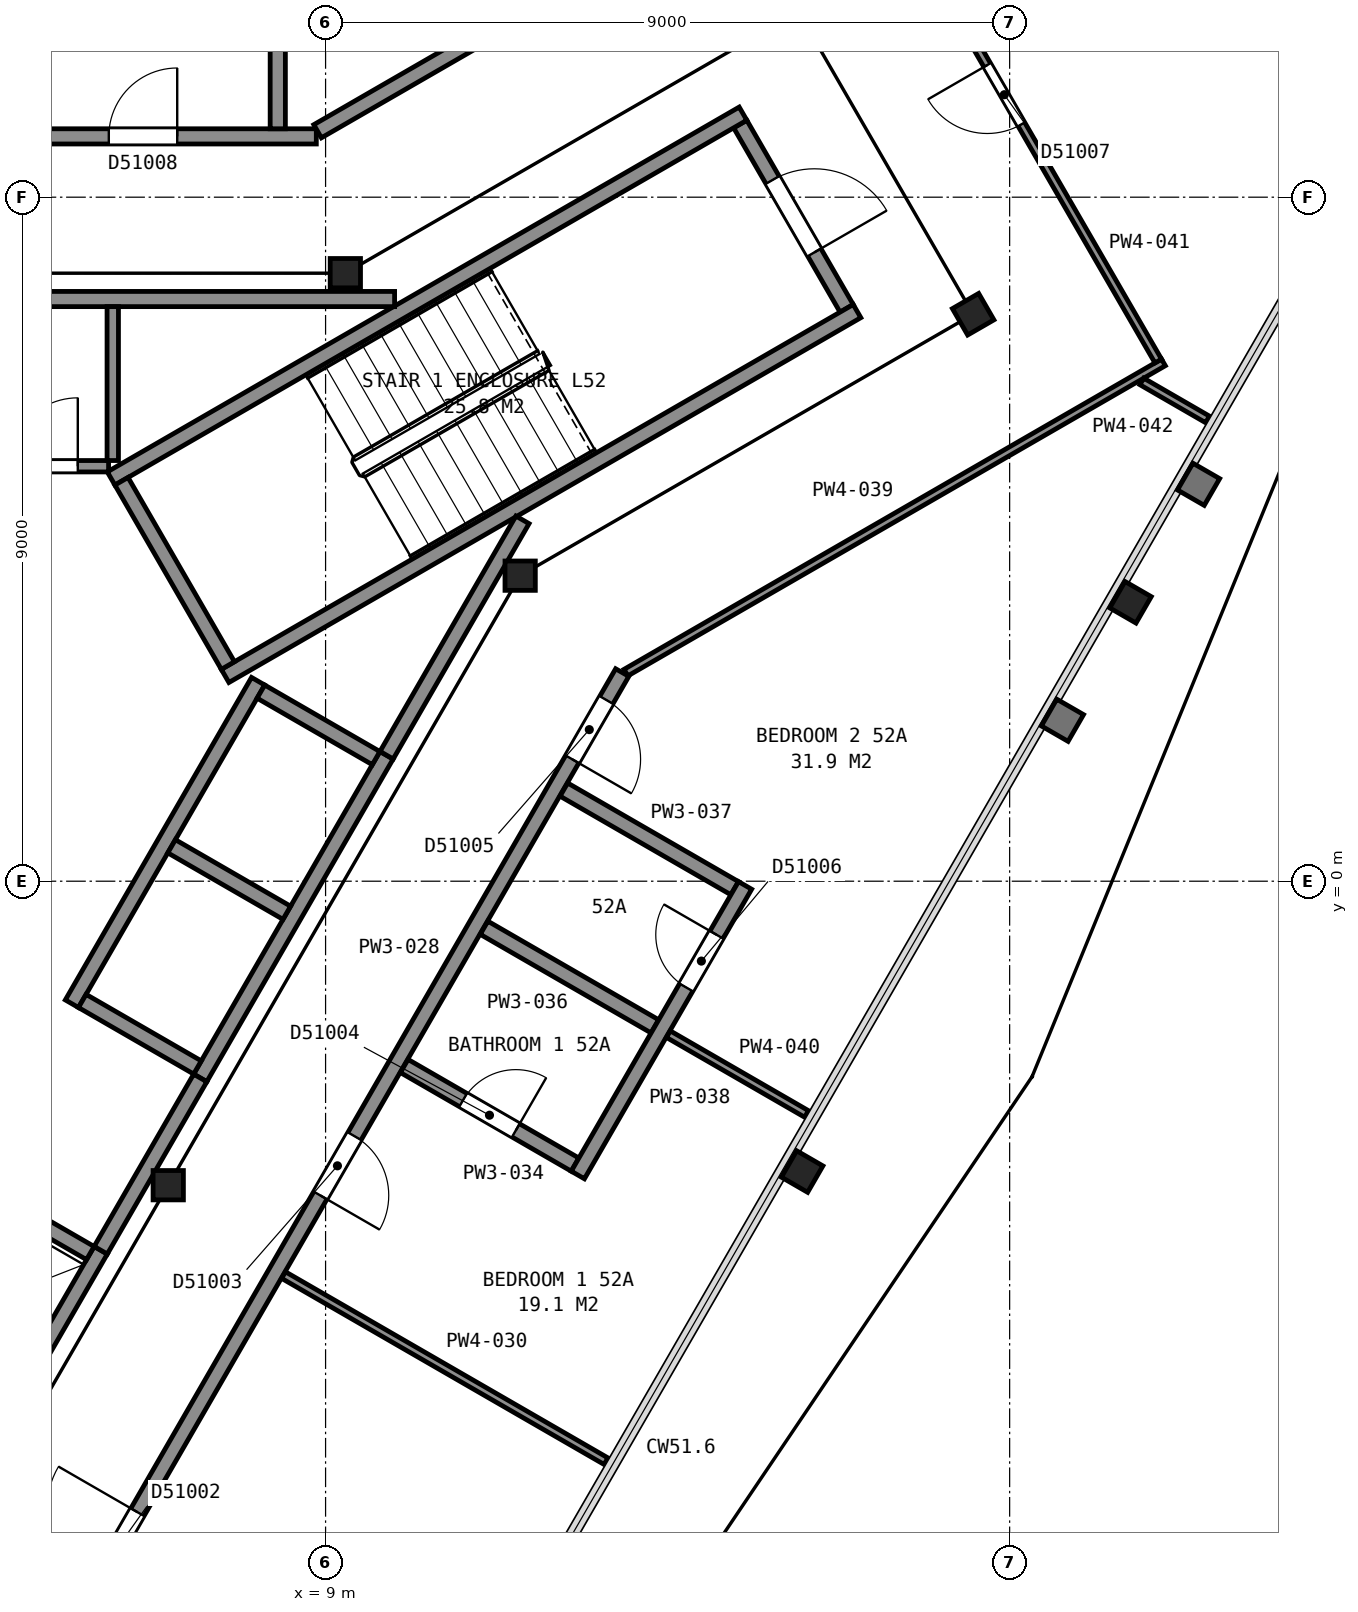
"""IFC4 building model, lengths in metres.
Left out: names, types, materials, properties, quantities, classifications, styles, units other than length and angle.
Written with IfcOpenShell. Run it as: python <this file> out.ifc"""

import sys

from ifc_helpers import new_model, si_unit, direction, frame, frame_2d, origin, origin_2d, place, context, subcontext, project, spatial, rectangle, i_section, extrude, element, fill, save


model = new_model("IFC4")
c1 = context("Model", 3, precision=1e-05, world=origin(), true_north=direction((0.0, 1.0)))
c2 = subcontext(c1, "Body", "Model", "MODEL_VIEW")
j1 = project(units=[si_unit("LENGTHUNIT", "METRE"), si_unit("PLANEANGLEUNIT", "RADIAN")], contexts=[c1])
p1 = place(None, origin())
s1 = spatial("IfcSite", under=j1, at=p1, CompositionType="ELEMENT")
p2 = place(p1, origin())
s2 = spatial("IfcBuilding", under=s1, at=p2, CompositionType="ELEMENT")
p3 = place(p2, frame((0.0, 0.0, 210.1)))
s3 = spatial("IfcBuildingStorey", under=s2, at=p3, CompositionType="ELEMENT", Elevation=210.1)
p4 = place(p3, frame((15.27, -3.82, 0.0), z_axis=(0.0, 0.0, 1.0), x_axis=(-0.5, -0.866025403784, 0.0)))
e1 = element("IfcColumn", 1, at=p4, inside=s3, PredefinedType="COLUMN", context=c2, shape_type="SweptSolid", body=[
    extrude(i_section(OverallWidth=0.401, OverallDepth=0.399, WebThickness=0.025, FlangeThickness=0.04, FilletRadius=0.015, at=origin_2d()), origin(), (0.0, 0.0, 1.0), 3.665),
])
p5 = place(p3, frame((19.59, 3.67, 0.0), z_axis=(0.0, 0.0, 1.0), x_axis=(-0.5, -0.866025403784, 0.0)))
e2 = element("IfcColumn", 2, at=p5, inside=s3, PredefinedType="COLUMN", context=c2, shape_type="SweptSolid", body=[
    extrude(i_section(OverallWidth=0.401, OverallDepth=0.399, WebThickness=0.025, FlangeThickness=0.04, FilletRadius=0.015, at=origin_2d()), origin(), (0.0, 0.0, 1.0), 3.66),
])
p6 = place(p3, frame((11.56, 4.02, 0.0), z_axis=(0.0, 0.0, 1.0), x_axis=(1.0, 0.0, 0.0)))
e3 = element("IfcColumn", 3, at=p6, inside=s3, PredefinedType="COLUMN", context=c2, shape_type="SweptSolid", body=[
    extrude(i_section(OverallWidth=0.399, OverallDepth=0.386, WebThickness=0.021, FlangeThickness=0.033, FilletRadius=0.015, at=origin_2d()), origin(), (0.0, 0.0, 1.0), 3.7),
])
p7 = place(p3, frame((17.52, 7.46, 0.0), z_axis=(0.0, 0.0, 1.0), x_axis=(0.5, -0.866025403784, 0.0)))
e4 = element("IfcColumn", 4, at=p7, inside=s3, PredefinedType="COLUMN", context=c2, shape_type="SweptSolid", body=[
    extrude(i_section(OverallWidth=0.401, OverallDepth=0.399, WebThickness=0.025, FlangeThickness=0.04, FilletRadius=0.015, at=origin_2d()), origin(), (0.0, 0.0, 1.0), 3.7),
])
for number, where, z_axis, x_axis in (
    (5, (9.26, 8.0, 0.0), (0.0, 0.0, 1.0), (1.0, 0.0, 0.0)),
    (6, (6.93, -4.0, 0.0), (0.0, 0.0, 1.0), (1.0, 0.0, 0.0)),
):
    element("IfcColumn", number, at=place(p3, frame(where, z_axis=z_axis, x_axis=x_axis)), inside=s3, PredefinedType="COLUMN", context=c2, shape_type="SweptSolid", body=[
        extrude(i_section(OverallWidth=0.399, OverallDepth=0.386, WebThickness=0.021, FlangeThickness=0.033, FilletRadius=0.015, at=origin_2d()), origin(), (0.0, 0.0, 1.0), 3.7),
    ])
p8 = place(p3, frame((15.855, 7.538, 0.0), z_axis=(0.0, 0.0, 1.0), x_axis=(-0.500049511043, 0.865996816683, 0.0)))
e7 = element("IfcWall", 7, at=p8, inside=s3, PredefinedType="PARTITIONING", context=c2, shape_type="SweptSolid", body=[
    extrude(rectangle(XDim=2.8, YDim=0.2, at=frame_2d((1.4, 0.0))), origin(), (0.0, 0.0, 1.0), 3.45),
])
p9 = place(p8, frame((0.85, 0.0, 0.0)))
e8 = element("IfcOpeningElement", 8, at=p9, cuts=e7, PredefinedType="OPENING", context=c2, shape_type="SweptSolid", body=[
    extrude(rectangle(XDim=1.1, YDim=2.1, at=frame_2d((0.55, 1.05))), frame((0.0, 0.11, 0.0), z_axis=(0.0, -1.0, 0.0), x_axis=(1.0, 0.0, 0.0)), (0.0, 0.0, 1.0), 0.22),
])
for number, where, z_axis, x_axis in (
    (9, (6.178, 5.299, 0.0), (0.0, 0.0, 1.0), (0.866, 0.5, 0.0)),
    (10, (7.678, 2.701, 0.0), (0.0, 0.0, 1.0), (0.866, 0.5, 0.0)),
):
    element("IfcWall", number, at=place(p3, frame(where, z_axis=z_axis, x_axis=x_axis)), inside=s3, PredefinedType="PARTITIONING", context=c2, shape_type="SweptSolid", body=[
        extrude(rectangle(XDim=9.6, YDim=0.2, at=frame_2d((4.8, 0.0))), origin(), (0.0, 0.0, 1.0), 3.45),
    ])
p10 = place(p3, frame((7.715, 2.838, 0.0), z_axis=(0.0, 0.0, 1.0), x_axis=(-0.500049511043, 0.865996816683, 0.0)))
e11 = element("IfcWall", 11, at=p10, inside=s3, PredefinedType="PARTITIONING", context=c2, shape_type="SweptSolid", body=[
    extrude(rectangle(XDim=2.8, YDim=0.2, at=frame_2d((1.4, 0.0))), origin(), (0.0, 0.0, 1.0), 3.45),
])
p11 = place(p3, frame((4.766, -7.065, 0.0), z_axis=(0.0, 0.0, 1.0), x_axis=(0.499948979701, 0.866054858364, 0.0)))
e12 = element("IfcWall", 12, at=p11, inside=s3, PredefinedType="PARTITIONING", context=c2, shape_type="SweptSolid", body=[
    extrude(rectangle(XDim=2.55, YDim=0.2, at=frame_2d((1.275, 0.0))), origin(), (0.0, 0.0, 1.0), 3.7),
])
p12 = place(p3, frame((7.351, -2.587, 0.0), z_axis=(0.0, 0.0, 1.0), x_axis=(0.500002801628, 0.866023786258, 0.0)))
e13 = element("IfcWall", 13, at=p12, inside=s3, PredefinedType="PARTITIONING", context=c2, shape_type="SweptSolid", body=[
    extrude(rectangle(XDim=4.9, YDim=0.2, at=frame_2d((2.45, 0.0))), origin(), (0.0, 0.0, 1.0), 3.7),
])
p13 = place(p3, frame((5.663, -1.612, 0.0), z_axis=(0.0, 0.0, 1.0), x_axis=(0.49998122708, 0.866036242063, 0.0)))
e14 = element("IfcWall", 14, at=p13, inside=s3, PredefinedType="PARTITIONING", context=c2, shape_type="SweptSolid", body=[
    extrude(rectangle(XDim=4.9, YDim=0.2, at=frame_2d((2.45, 0.0))), origin(), (0.0, 0.0, 1.0), 3.7),
])
p14 = place(p3, frame((9.665, 1.62, 0.0), z_axis=(0.0, 0.0, 1.0), x_axis=(-0.866002029911, 0.500040482552, 0.0)))
e15 = element("IfcWall", 15, at=p14, inside=s3, PredefinedType="PARTITIONING", context=c2, shape_type="SweptSolid", body=[
    extrude(rectangle(XDim=1.75, YDim=0.2, at=frame_2d((0.875, 0.0))), origin(), (0.0, 0.0, 1.0), 3.7),
])
for number, where, z_axis, x_axis in (
    (16, (8.49, -0.416, 0.0), (0.0, 0.0, 1.0), (-0.866, 0.5, 0.0)),
    (17, (7.315, -2.451, 0.0), (0.0, 0.0, 1.0), (-0.866, 0.5, 0.0)),
):
    element("IfcWall", number, at=place(p3, frame(where, z_axis=z_axis, x_axis=x_axis)), inside=s3, PredefinedType="PARTITIONING", context=c2, shape_type="SweptSolid", body=[
        extrude(rectangle(XDim=1.75, YDim=0.2, at=frame_2d((0.875, 0.0))), origin(), (0.0, 0.0, 1.0), 3.7),
    ])
p15 = place(p3, frame((5.905, -4.893, 0.0), z_axis=(0.0, 0.0, 1.0), x_axis=(-0.866002029911, 0.500040482552, 0.0)))
e18 = element("IfcWall", 18, at=p15, inside=s3, PredefinedType="PARTITIONING", context=c2, shape_type="SweptSolid", body=[
    extrude(rectangle(XDim=1.75, YDim=0.2, at=frame_2d((0.875, 0.0))), origin(), (0.0, 0.0, 1.0), 3.7),
])
p16 = place(p3, frame((-3.933, 7.66, 0.0), z_axis=(0.0, 0.0, 1.0), x_axis=(1.0, 0.0, 0.0)))
e19 = element("IfcWall", 19, at=p16, inside=s3, PredefinedType="PARTITIONING", context=c2, shape_type="SweptSolid", body=[
    extrude(rectangle(XDim=13.841, YDim=0.2, at=frame_2d((6.92, 0.0))), origin(), (0.0, 0.0, 1.0), 3.45),
])
p17 = place(p3, frame((0.925, 5.46, 0.0), z_axis=(0.0, 0.0, 1.0), x_axis=(1.0, 0.0, 0.0)))
e20 = element("IfcWall", 20, at=p17, inside=s3, PredefinedType="PARTITIONING", context=c2, shape_type="SweptSolid", body=[
    extrude(rectangle(XDim=5.22, YDim=0.15, at=frame_2d((2.61, 0.0))), origin(), (0.0, 0.0, 1.0), 3.45),
])
p18 = place(p17, frame((3.915, 0.0, 0.0)))
e21 = element("IfcOpeningElement", 21, at=p18, cuts=e20, PredefinedType="OPENING", context=c2, shape_type="SweptSolid", body=[
    extrude(rectangle(XDim=0.9, YDim=2.1, at=frame_2d((0.45, 1.05))), frame((0.0, 0.085, 0.0), z_axis=(0.0, -1.0, 0.0), x_axis=(1.0, 0.0, 0.0)), (0.0, 0.0, 1.0), 0.17),
])
p19 = place(p3, frame((6.042, -4.855, 0.0), z_axis=(0.0, 0.0, 1.0), x_axis=(0.500252727967, 0.865879442048, 0.0)))
e22 = element("IfcWall", 22, at=p19, inside=s3, PredefinedType="PARTITIONING", context=c2, shape_type="SweptSolid", body=[
    extrude(rectangle(XDim=2.617, YDim=0.2, at=frame_2d((1.309, 0.0))), origin(), (0.0, 0.0, 1.0), 3.45),
])
p20 = place(p3, frame((6.2, 5.535, 0.0), z_axis=(0.0, 0.0, 1.0), x_axis=(0.0, 1.0, 0.0)))
e23 = element("IfcWall", 23, at=p20, inside=s3, PredefinedType="PARTITIONING", context=c2, shape_type="SweptSolid", body=[
    extrude(rectangle(XDim=2.025, YDim=0.15, at=frame_2d((1.013, 0.0))), origin(), (0.0, 0.0, 1.0), 3.45),
])
p21 = place(p3, frame((9.803, 1.658, 0.0), z_axis=(0.0, 0.0, 1.0), x_axis=(0.499943114462, 0.866058244174, 0.0)))
e24 = element("IfcWall", 24, at=p21, inside=s3, PredefinedType="PARTITIONING", context=c2, shape_type="SweptSolid", body=[
    extrude(rectangle(XDim=3.576, YDim=0.2, at=frame_2d((1.788, 0.0))), origin(), (0.0, 0.0, 1.0), 3.45),
])
p22 = place(p3, frame((-8.828, 9.8, 0.0), z_axis=(0.0, 0.0, 1.0), x_axis=(1.0, 0.0, 0.0)))
e25 = element("IfcWall", 25, at=p22, inside=s3, PredefinedType="PARTITIONING", context=c2, shape_type="SweptSolid", body=[
    extrude(rectangle(XDim=17.706, YDim=0.2, at=frame_2d((8.853, 0.0))), origin(), (0.0, 0.0, 1.0), 2.713),
])
p23 = place(p22, frame((14.976, 0.0, 0.0)))
e26 = element("IfcOpeningElement", 26, at=p23, cuts=e25, PredefinedType="OPENING", context=c2, shape_type="SweptSolid", body=[
    extrude(rectangle(XDim=0.9, YDim=2.1, at=frame_2d((0.45, 1.05))), frame((0.0, 0.11, 0.0), z_axis=(0.0, -1.0, 0.0), x_axis=(1.0, 0.0, 0.0)), (0.0, 0.0, 1.0), 0.22),
])
p24 = place(p22, frame((10.673, 0.0, 0.0)))
e27 = element("IfcOpeningElement", 27, at=p24, cuts=e25, PredefinedType="OPENING", context=c2, shape_type="SweptSolid", body=[
    extrude(rectangle(XDim=0.9, YDim=2.1, at=frame_2d((0.45, 1.05))), frame((0.0, 0.11, 0.0), z_axis=(0.0, -1.0, 0.0), x_axis=(1.0, 0.0, 0.0)), (0.0, 0.0, 1.0), 0.22),
])
p25 = place(p22, frame((5.57, 0.0, 0.0)))
e28 = element("IfcOpeningElement", 28, at=p25, cuts=e25, PredefinedType="OPENING", context=c2, shape_type="SweptSolid", body=[
    extrude(rectangle(XDim=0.9, YDim=2.1, at=frame_2d((0.45, 1.05))), frame((0.0, 0.11, 0.0), z_axis=(0.0, -1.0, 0.0), x_axis=(1.0, 0.0, 0.0)), (0.0, 0.0, 1.0), 0.22),
])
p26 = place(p22, frame((1.3, 0.0, 0.0)))
e29 = element("IfcOpeningElement", 29, at=p26, cuts=e25, PredefinedType="OPENING", context=c2, shape_type="SweptSolid", body=[
    extrude(rectangle(XDim=0.9, YDim=2.1, at=frame_2d((0.45, 1.05))), frame((0.0, 0.11, 0.0), z_axis=(0.0, -1.0, 0.0), x_axis=(1.0, 0.0, 0.0)), (0.0, 0.0, 1.0), 0.22),
])
p27 = place(p3, frame((12.903, 2.745, 0.0), z_axis=(0.0, 0.0, 1.0), x_axis=(-0.499999743747, -0.866025551732, 0.0)))
e30 = element("IfcWall", 30, at=p27, inside=s3, PredefinedType="PARTITIONING", context=c2, shape_type="SweptSolid", body=[
    extrude(rectangle(XDim=17.656, YDim=0.2, at=frame_2d((8.828, 0.0))), origin(), (0.0, 0.0, 1.0), 2.713),
])
p28 = place(p27, frame((12.756, 0.0, 0.0)))
e31 = element("IfcOpeningElement", 31, at=p28, cuts=e30, PredefinedType="OPENING", context=c2, shape_type="SweptSolid", body=[
    extrude(rectangle(XDim=1.2, YDim=2.1, at=frame_2d((0.6, 1.05))), frame((0.0, 0.11, 0.0), z_axis=(0.0, -1.0, 0.0), x_axis=(1.0, 0.0, 0.0)), (0.0, 0.0, 1.0), 0.22),
])
p29 = place(p27, frame((7.044, 0.0, 0.0)))
e32 = element("IfcOpeningElement", 32, at=p29, cuts=e30, PredefinedType="OPENING", context=c2, shape_type="SweptSolid", body=[
    extrude(rectangle(XDim=0.9, YDim=2.1, at=frame_2d((0.45, 1.05))), frame((0.0, 0.11, 0.0), z_axis=(0.0, -1.0, 0.0), x_axis=(1.0, 0.0, 0.0)), (0.0, 0.0, 1.0), 0.22),
])
p30 = place(p27, frame((0.417, 0.0, 0.0)))
e33 = element("IfcOpeningElement", 33, at=p30, cuts=e30, PredefinedType="OPENING", context=c2, shape_type="SweptSolid", body=[
    extrude(rectangle(XDim=0.9, YDim=2.1, at=frame_2d((0.45, 1.05))), frame((0.0, 0.11, 0.0), z_axis=(0.0, -1.0, 0.0), x_axis=(1.0, 0.0, 0.0)), (0.0, 0.0, 1.0), 0.22),
])
p31 = place(p3, frame((8.447, -5.182, 0.0), z_axis=(0.0, 0.0, 1.0), x_axis=(0.866106755222, -0.499859068697, 0.0)))
e34 = element("IfcWall", 34, at=p31, inside=s3, PredefinedType="PARTITIONING", context=c2, shape_type="SweptSolid", body=[
    extrude(rectangle(XDim=4.899, YDim=0.1, at=frame_2d((2.449, 0.0))), origin(), (0.0, 0.0, 1.0), 2.713),
])
p32 = place(p3, frame((8.371, 13.129, 0.0), z_axis=(0.0, 0.0, 1.0), x_axis=(0.0, -1.0, 0.0)))
e35 = element("IfcWall", 35, at=p32, inside=s3, PredefinedType="PARTITIONING", context=c2, shape_type="SweptSolid", body=[
    extrude(rectangle(XDim=3.229, YDim=0.2, at=frame_2d((1.615, 0.0))), origin(), (0.0, 0.0, 1.0), 2.713),
])
p33 = place(p32, frame((1.329, 0.0, 0.0)))
e36 = element("IfcOpeningElement", 36, at=p33, cuts=e35, PredefinedType="OPENING", context=c2, shape_type="SweptSolid", body=[
    extrude(rectangle(XDim=0.8, YDim=2.1, at=frame_2d((0.4, 1.05))), frame((0.0, 0.11, 0.0), z_axis=(0.0, -1.0, 0.0), x_axis=(1.0, 0.0, 0.0)), (0.0, 0.0, 1.0), 0.22),
])
p34 = place(p3, frame((8.895, 9.867, 0.0), z_axis=(0.0, 0.0, 1.0), x_axis=(0.866079355551, 0.499906541154, 0.0)))
e37 = element("IfcWall", 37, at=p34, inside=s3, PredefinedType="PARTITIONING", context=c2, shape_type="SweptSolid", body=[
    extrude(rectangle(XDim=8.113, YDim=0.2, at=frame_2d((4.056, 0.0))), origin(), (0.0, 0.0, 1.0), 2.713),
])
p35 = place(p3, frame((10.035, -2.431, 0.0), z_axis=(0.0, 0.0, 1.0), x_axis=(0.866028930478, -0.499993891537, 0.0)))
e38 = element("IfcWall", 38, at=p35, inside=s3, PredefinedType="PARTITIONING", context=c2, shape_type="SweptSolid", body=[
    extrude(rectangle(XDim=2.595, YDim=0.2, at=frame_2d((1.298, 0.0))), origin(), (0.0, 0.0, 1.0), 2.713),
])
p36 = place(p35, frame((0.895, 0.0, 0.0)))
e39 = element("IfcOpeningElement", 39, at=p36, cuts=e38, PredefinedType="OPENING", context=c2, shape_type="SweptSolid", body=[
    extrude(rectangle(XDim=0.8, YDim=2.1, at=frame_2d((0.4, 1.05))), frame((0.0, 0.11, 0.0), z_axis=(0.0, -1.0, 0.0), x_axis=(1.0, 0.0, 0.0)), (0.0, 0.0, 1.0), 0.22),
])
for number, where, z_axis, x_axis in (
    (40, (11.085, -0.613, 0.0), (0.0, 0.0, 1.0), (0.866, -0.5, 0.0)),
    (41, (12.135, 1.206, 0.0), (0.0, 0.0, 1.0), (0.866, -0.5, 0.0)),
):
    element("IfcWall", number, at=place(p3, frame(where, z_axis=z_axis, x_axis=x_axis)), inside=s3, PredefinedType="PARTITIONING", context=c2, shape_type="SweptSolid", body=[
        extrude(rectangle(XDim=2.595, YDim=0.2, at=frame_2d((1.297, 0.0))), origin(), (0.0, 0.0, 1.0), 2.713),
    ])
p37 = place(p3, frame((12.319, -3.866, 0.0), z_axis=(0.0, 0.0, 1.0), x_axis=(0.50001224981, 0.866018331238, 0.0)))
e42 = element("IfcWall", 42, at=p37, inside=s3, PredefinedType="PARTITIONING", context=c2, shape_type="SweptSolid", body=[
    extrude(rectangle(XDim=4.4, YDim=0.2, at=frame_2d((2.2, 0.0))), origin(), (0.0, 0.0, 1.0), 2.713),
])
p38 = place(p37, frame((2.85, 0.0, 0.0)))
e43 = element("IfcOpeningElement", 43, at=p38, cuts=e42, PredefinedType="OPENING", context=c2, shape_type="SweptSolid", body=[
    extrude(rectangle(XDim=0.8, YDim=2.1, at=frame_2d((0.4, 1.05))), frame((0.0, 0.11, 0.0), z_axis=(0.0, -1.0, 0.0), x_axis=(1.0, 0.0, 0.0)), (0.0, 0.0, 1.0), 0.22),
])
p39 = place(p3, frame((12.952, 2.744, 0.0), z_axis=(0.0, 0.0, 1.0), x_axis=(0.86608949446, 0.499888975259, 0.0)))
e44 = element("IfcWall", 44, at=p39, inside=s3, PredefinedType="PARTITIONING", context=c2, shape_type="SweptSolid", body=[
    extrude(rectangle(XDim=8.165, YDim=0.1, at=frame_2d((4.083, 0.0))), origin(), (0.0, 0.0, 1.0), 2.713),
])
p40 = place(p3, frame((13.51, -2.012, 0.0), z_axis=(0.0, 0.0, 1.0), x_axis=(0.866022890907, -0.500004352405, 0.0)))
e45 = element("IfcWall", 45, at=p40, inside=s3, PredefinedType="PARTITIONING", context=c2, shape_type="SweptSolid", body=[
    extrude(rectangle(XDim=2.099, YDim=0.1, at=frame_2d((1.05, 0.0))), origin(), (0.0, 0.0, 1.0), 2.713),
])
p41 = place(p3, frame((15.928, 13.812, 0.0), z_axis=(0.0, 0.0, 1.0), x_axis=(0.500422653123, -0.865781247337, 0.0)))
e46 = element("IfcWall", 46, at=p41, inside=s3, PredefinedType="PARTITIONING", context=c2, shape_type="SweptSolid", body=[
    extrude(rectangle(XDim=8.047, YDim=0.1, at=frame_2d((4.024, 0.0))), origin(), (0.0, 0.0, 1.0), 2.713),
])
p42 = place(p41, frame((3.55, 0.0, 0.0)))
e47 = element("IfcOpeningElement", 47, at=p42, cuts=e46, PredefinedType="OPENING", context=c2, shape_type="SweptSolid", body=[
    extrude(rectangle(XDim=0.9, YDim=2.1, at=frame_2d((0.45, 1.05))), frame((0.0, 0.06, 0.0), z_axis=(0.0, -1.0, 0.0), x_axis=(1.0, 0.0, 0.0)), (0.0, 0.0, 1.0), 0.12),
])
p43 = place(p3, frame((19.739, 6.576, 0.0), z_axis=(0.0, 0.0, 1.0), x_axis=(0.865855657918, -0.500293893279, 0.0)))
e48 = element("IfcWall", 48, at=p43, inside=s3, PredefinedType="PARTITIONING", context=c2, shape_type="SweptSolid", body=[
    extrude(rectangle(XDim=0.999, YDim=0.1, at=frame_2d((0.499, 0.0))), origin(), (0.0, 0.0, 1.0), 2.713),
])
p44 = place(p9, origin())
e49 = element("IfcDoor", 49, at=p44, inside=s3, OperationType="SINGLE_SWING_LEFT", PredefinedType="DOOR", context=c2, shape_type="SweptSolid", body=[
    extrude(rectangle(XDim=1.1, YDim=2.1, at=frame_2d((0.55, 1.05))), frame((0.0, 0.025, 0.0), z_axis=(0.0, -1.0, 0.0), x_axis=(1.0, 0.0, 0.0)), (0.0, 0.0, 1.0), 0.05),
])
fill(e8, e49)
p45 = place(p18, origin())
e50 = element("IfcDoor", 50, at=p45, inside=s3, OperationType="SINGLE_SWING_RIGHT", PredefinedType="DOOR", context=c2, shape_type="SweptSolid", body=[
    extrude(rectangle(XDim=0.9, YDim=2.1, at=frame_2d((0.45, 1.05))), frame((0.0, 0.025, 0.0), z_axis=(0.0, -1.0, 0.0), x_axis=(1.0, 0.0, 0.0)), (0.0, 0.0, 1.0), 0.05),
])
fill(e21, e50)
p46 = place(p23, origin())
e51 = element("IfcDoor", 51, at=p46, inside=s3, OperationType="SINGLE_SWING_RIGHT", PredefinedType="DOOR", context=c2, shape_type="SweptSolid", body=[
    extrude(rectangle(XDim=0.9, YDim=2.1, at=frame_2d((0.45, 1.05))), frame((0.0, 0.025, 0.0), z_axis=(0.0, -1.0, 0.0), x_axis=(1.0, 0.0, 0.0)), (0.0, 0.0, 1.0), 0.05),
])
fill(e26, e51)
p47 = place(p28, origin())
e52 = element("IfcDoor", 52, at=p47, inside=s3, OperationType="SINGLE_SWING_LEFT", PredefinedType="DOOR", context=c2, shape_type="SweptSolid", body=[
    extrude(rectangle(XDim=1.2, YDim=2.1, at=frame_2d((0.6, 1.05))), frame((0.0, 0.025, 0.0), z_axis=(0.0, -1.0, 0.0), x_axis=(1.0, 0.0, 0.0)), (0.0, 0.0, 1.0), 0.05),
])
fill(e31, e52)
p48 = place(p29, origin())
e53 = element("IfcDoor", 53, at=p48, inside=s3, OperationType="SINGLE_SWING_RIGHT", PredefinedType="DOOR", context=c2, shape_type="SweptSolid", body=[
    extrude(rectangle(XDim=0.9, YDim=2.1, at=frame_2d((0.45, 1.05))), frame((0.0, 0.025, 0.0), z_axis=(0.0, -1.0, 0.0), x_axis=(1.0, 0.0, 0.0)), (0.0, 0.0, 1.0), 0.05),
])
fill(e32, e53)
p49 = place(p30, origin())
e54 = element("IfcDoor", 54, at=p49, inside=s3, OperationType="SINGLE_SWING_RIGHT", PredefinedType="DOOR", context=c2, shape_type="SweptSolid", body=[
    extrude(rectangle(XDim=0.9, YDim=2.1, at=frame_2d((0.45, 1.05))), frame((0.0, 0.025, 0.0), z_axis=(0.0, -1.0, 0.0), x_axis=(1.0, 0.0, 0.0)), (0.0, 0.0, 1.0), 0.05),
])
fill(e33, e54)
p50 = place(p36, origin())
e55 = element("IfcDoor", 55, at=p50, inside=s3, OperationType="SINGLE_SWING_RIGHT", PredefinedType="DOOR", context=c2, shape_type="SweptSolid", body=[
    extrude(rectangle(XDim=0.8, YDim=2.1, at=frame_2d((0.4, 1.05))), frame((0.0, 0.025, 0.0), z_axis=(0.0, -1.0, 0.0), x_axis=(1.0, 0.0, 0.0)), (0.0, 0.0, 1.0), 0.05),
])
fill(e39, e55)
p51 = place(p38, origin())
e56 = element("IfcDoor", 56, at=p51, inside=s3, OperationType="SINGLE_SWING_RIGHT", PredefinedType="DOOR", context=c2, shape_type="SweptSolid", body=[
    extrude(rectangle(XDim=0.8, YDim=2.1, at=frame_2d((0.4, 1.05))), frame((0.0, 0.025, 0.0), z_axis=(0.0, -1.0, 0.0), x_axis=(1.0, 0.0, 0.0)), (0.0, 0.0, 1.0), 0.05),
])
fill(e43, e56)
p52 = place(p42, origin())
e57 = element("IfcDoor", 57, at=p52, inside=s3, OperationType="SINGLE_SWING_LEFT", PredefinedType="DOOR", context=c2, shape_type="SweptSolid", body=[
    extrude(rectangle(XDim=0.9, YDim=2.1, at=frame_2d((0.45, 1.05))), frame((0.0, 0.025, 0.0), z_axis=(0.0, -1.0, 0.0), x_axis=(1.0, 0.0, 0.0)), (0.0, 0.0, 1.0), 0.05),
])
fill(e47, e57)
save(model, sys.argv[1])
